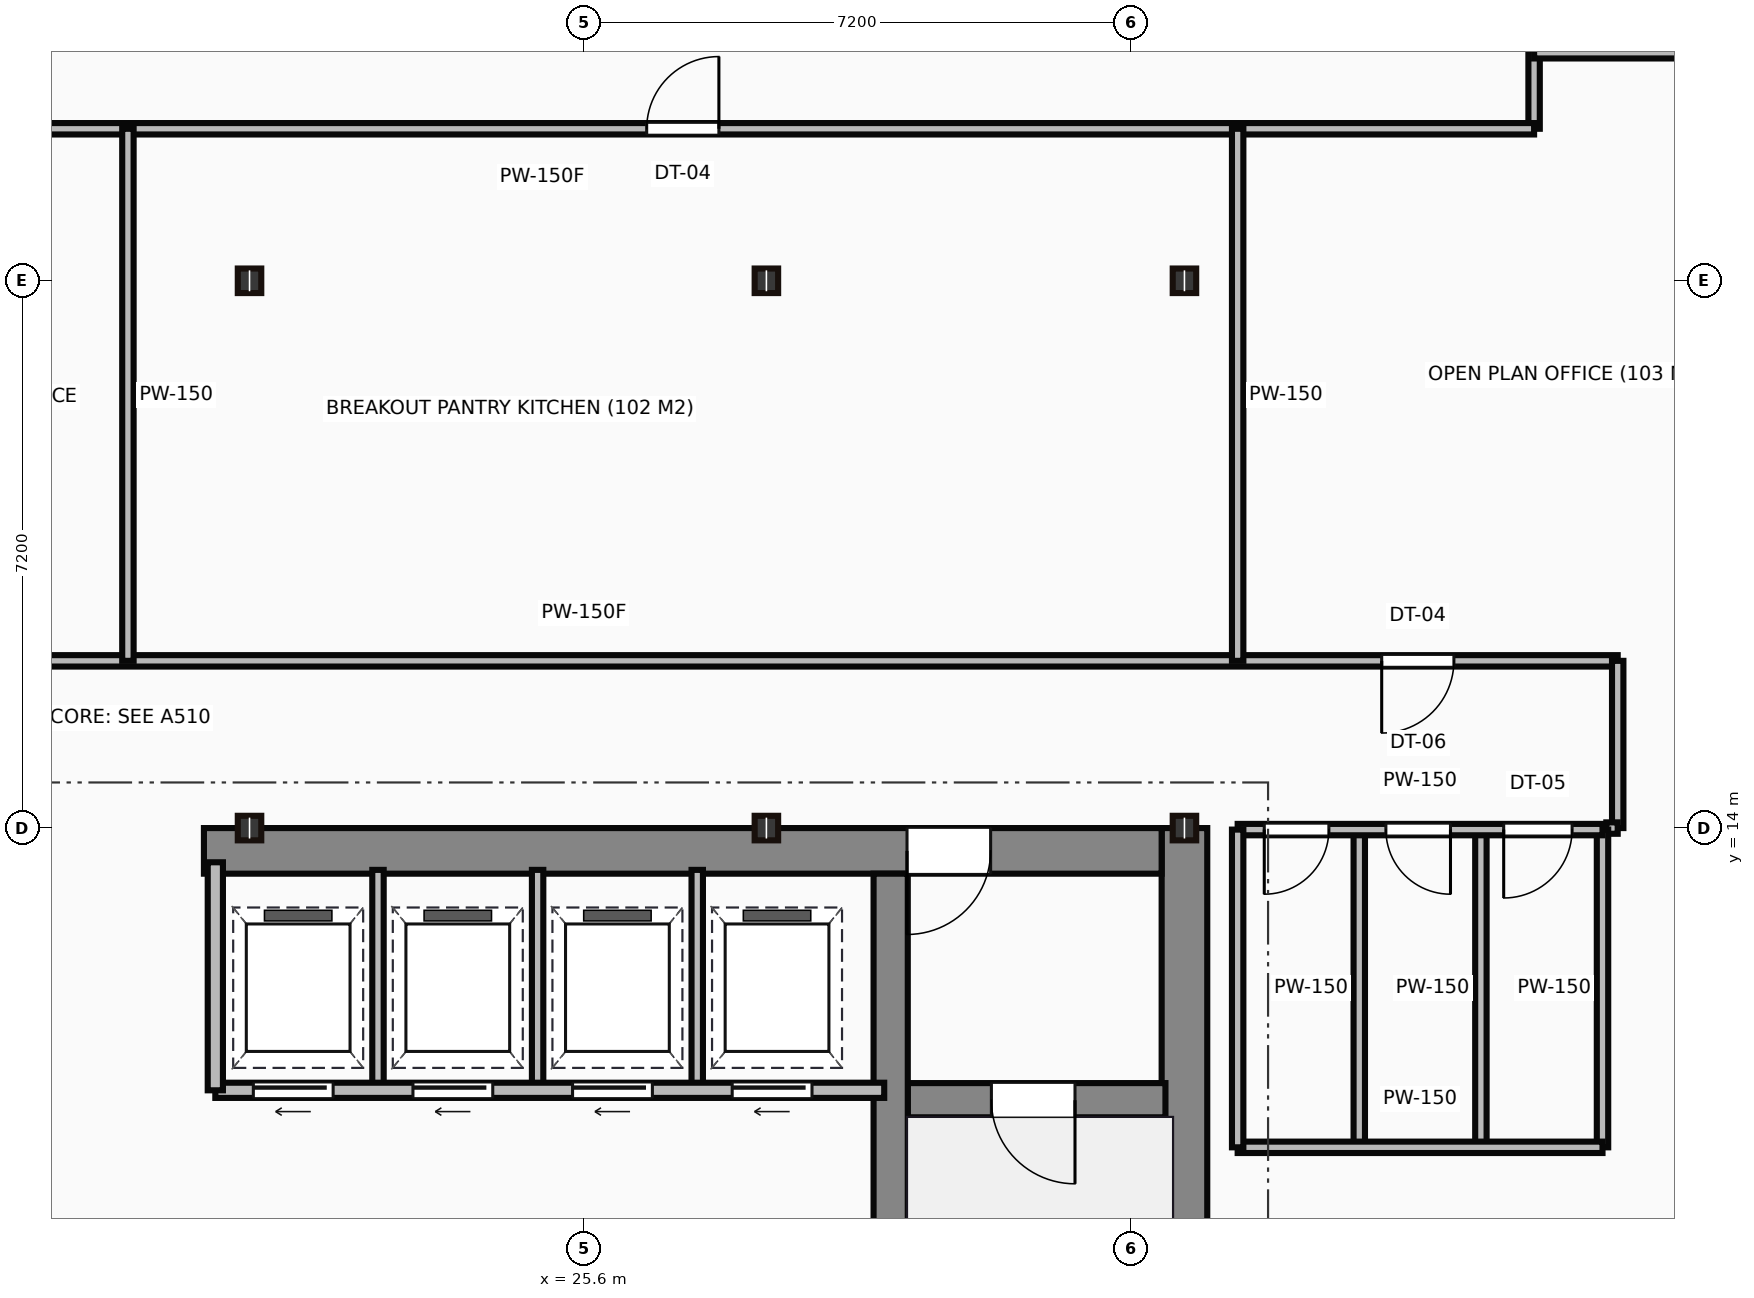
"""IFC4 building model, lengths in metres.
Left out: names, types, materials, properties, quantities, classifications, styles, units other than length and angle.
Written with IfcOpenShell. Run it as: python <this file> out.ifc"""

import sys

from ifc_helpers import new_model, si_unit, direction, frame, frame_2d, origin, origin_2d, place, context, subcontext, project, spatial, rectangle, i_section, extrude, source, transform, mapped, element, fill, save


model = new_model("IFC4")
c1 = context("Model", 3, precision=1e-05, world=origin(), true_north=direction((0.0, 1.0)))
c2 = subcontext(c1, "Body", "Model", "MODEL_VIEW")
j1 = project(units=[si_unit("LENGTHUNIT", "METRE"), si_unit("PLANEANGLEUNIT", "RADIAN")], contexts=[c1])
p1 = place(None, origin())
s1 = spatial("IfcSite", under=j1, at=p1, CompositionType="ELEMENT")
p2 = place(p1, origin())
s2 = spatial("IfcBuilding", under=s1, at=p2, CompositionType="ELEMENT")
p3 = place(p2, frame((0.0, 0.0, 232.4)))
s3 = spatial("IfcBuildingStorey", under=s2, at=p3, CompositionType="ELEMENT", Elevation=232.4)
m1 = source(origin(), c2, "Body", "SweptSolid", [
    extrude(rectangle(XDim=13.1, YDim=0.6, at=frame_2d((6.55, 0.0))), origin(), (0.0, 0.0, 1.0), 3.65),
])
p4 = place(p3, frame((33.5, 0.9, 0.0), z_axis=(0.0, 0.0, 1.0), x_axis=(0.0, 1.0, 0.0)))
e1 = element("IfcWall", 1, at=p4, inside=s3, PredefinedType="SHEAR", context=c2, shape_type="MappedRepresentation", body=[
    mapped(m1, transform((0.0, 0.0, 0.0))),
])
m2 = source(origin(), c2, "Body", "SweptSolid", [
    extrude(rectangle(XDim=12.6, YDim=0.6, at=frame_2d((6.3, 0.0))), origin(), (0.0, 0.0, 1.0), 3.65),
])
p5 = place(p3, frame((20.6, 13.7, 0.0), z_axis=(0.0, 0.0, 1.0), x_axis=(1.0, 0.0, 0.0)))
e2 = element("IfcWall", 2, at=p5, inside=s3, PredefinedType="SHEAR", context=c2, shape_type="MappedRepresentation", body=[
    mapped(m2, transform((0.0, 0.0, 0.0))),
])
p6 = place(p5, frame((9.25, 0.0, 0.0)))
e3 = element("IfcOpeningElement", 3, at=p6, cuts=e2, PredefinedType="OPENING", context=c2, shape_type="SweptSolid", body=[
    extrude(rectangle(XDim=1.1, YDim=2.15, at=frame_2d((0.55, 1.075))), frame((0.0, 0.31, 0.0), z_axis=(0.0, -1.0, 0.0), x_axis=(1.0, 0.0, 0.0)), (0.0, 0.0, 1.0), 0.62),
])
m3 = source(origin(), c2, "Body", "SweptSolid", [
    extrude(rectangle(XDim=12.5, YDim=0.45, at=frame_2d((6.25, 0.0))), origin(), (0.0, 0.0, 1.0), 3.65),
])
p7 = place(p3, frame((29.635, 0.9, 0.0), z_axis=(0.0, 0.0, 1.0), x_axis=(0.0, 1.0, 0.0)))
e4 = element("IfcWall", 4, at=p7, inside=s3, PredefinedType="SHEAR", context=c2, shape_type="MappedRepresentation", body=[
    mapped(m3, transform((0.0, 0.0, 0.0))),
])
m4 = source(origin(), c2, "Body", "SweptSolid", [
    extrude(rectangle(XDim=3.39, YDim=0.45, at=frame_2d((1.695, 0.0))), origin(), (0.0, 0.0, 1.0), 3.65),
])
p8 = place(p3, frame((29.86, 10.42, 0.0), z_axis=(0.0, 0.0, 1.0), x_axis=(1.0, 0.0, 0.0)))
e5 = element("IfcWall", 5, at=p8, inside=s3, PredefinedType="SHEAR", context=c2, shape_type="MappedRepresentation", body=[
    mapped(m4, transform((0.0, 0.0, 0.0))),
])
p9 = place(p8, frame((1.1, 0.0, 0.0)))
e6 = element("IfcOpeningElement", 6, at=p9, cuts=e5, PredefinedType="OPENING", context=c2, shape_type="SweptSolid", body=[
    extrude(rectangle(XDim=1.1, YDim=2.15, at=frame_2d((0.55, 1.075))), frame((0.0, 0.235, 0.0), z_axis=(0.0, -1.0, 0.0), x_axis=(1.0, 0.0, 0.0)), (0.0, 0.0, 1.0), 0.47),
])
m5 = source(origin(), c2, "Body", "SweptSolid", [
    extrude(i_section(OverallWidth=0.309, OverallDepth=0.323, WebThickness=0.014, FlangeThickness=0.023, at=origin_2d()), origin(), (0.0, 0.0, 1.0), 3.65),
])
for number, where, z_axis, x_axis in (
    (7, (21.2, 14.0, 0.0), (0.0, 0.0, 1.0), (1.0, 0.0, 0.0)),
    (8, (21.2, 21.2, 0.0), (0.0, 0.0, 1.0), (1.0, 0.0, 0.0)),
    (9, (28.0, 14.0, 0.0), (0.0, 0.0, 1.0), (1.0, 0.0, 0.0)),
    (10, (28.0, 21.2, 0.0), (0.0, 0.0, 1.0), (1.0, 0.0, 0.0)),
    (11, (33.5, 14.0, 0.0), (0.0, 0.0, 1.0), (1.0, 0.0, 0.0)),
    (12, (33.5, 21.2, 0.0), (0.0, 0.0, 1.0), (1.0, 0.0, 0.0)),
):
    element("IfcColumn", number, at=place(p3, frame(where, z_axis=z_axis, x_axis=x_axis)), inside=s3, PredefinedType="COLUMN", context=c2, shape_type="MappedRepresentation", body=[
        mapped(m5, transform((0.0, 0.0, 0.0))),
    ])
m6 = source(origin(), c2, "Body", "SweptSolid", [
    extrude(rectangle(XDim=8.8, YDim=0.2, at=frame_2d((4.4, 0.0))), origin(), (0.0, 0.0, 1.0), 3.35),
])
p10 = place(p3, frame((20.75, 10.55, 0.0), z_axis=(0.0, 0.0, 1.0), x_axis=(1.0, 0.0, 0.0)))
e13 = element("IfcWall", 13, at=p10, inside=s3, PredefinedType="PARTITIONING", context=c2, shape_type="MappedRepresentation", body=[
    mapped(m6, transform((0.0, 0.0, 0.0))),
])
p11 = place(p10, frame((0.5, 0.0, 0.0)))
e14 = element("IfcOpeningElement", 14, at=p11, cuts=e13, PredefinedType="OPENING", context=c2, shape_type="SweptSolid", body=[
    extrude(rectangle(XDim=1.05, YDim=2.15, at=frame_2d((0.525, 1.075))), frame((0.0, 0.11, 0.0), z_axis=(0.0, -1.0, 0.0), x_axis=(1.0, 0.0, 0.0)), (0.0, 0.0, 1.0), 0.22),
])
p12 = place(p10, frame((2.6, 0.0, 0.0)))
e15 = element("IfcOpeningElement", 15, at=p12, cuts=e13, PredefinedType="OPENING", context=c2, shape_type="SweptSolid", body=[
    extrude(rectangle(XDim=1.05, YDim=2.15, at=frame_2d((0.525, 1.075))), frame((0.0, 0.11, 0.0), z_axis=(0.0, -1.0, 0.0), x_axis=(1.0, 0.0, 0.0)), (0.0, 0.0, 1.0), 0.22),
])
p13 = place(p10, frame((4.7, 0.0, 0.0)))
e16 = element("IfcOpeningElement", 16, at=p13, cuts=e13, PredefinedType="OPENING", context=c2, shape_type="SweptSolid", body=[
    extrude(rectangle(XDim=1.05, YDim=2.15, at=frame_2d((0.525, 1.075))), frame((0.0, 0.11, 0.0), z_axis=(0.0, -1.0, 0.0), x_axis=(1.0, 0.0, 0.0)), (0.0, 0.0, 1.0), 0.22),
])
p14 = place(p10, frame((6.8, 0.0, 0.0)))
e17 = element("IfcOpeningElement", 17, at=p14, cuts=e13, PredefinedType="OPENING", context=c2, shape_type="SweptSolid", body=[
    extrude(rectangle(XDim=1.05, YDim=2.15, at=frame_2d((0.525, 1.075))), frame((0.0, 0.11, 0.0), z_axis=(0.0, -1.0, 0.0), x_axis=(1.0, 0.0, 0.0)), (0.0, 0.0, 1.0), 0.22),
])
m7 = source(origin(), c2, "Body", "SweptSolid", [
    extrude(rectangle(XDim=3.0, YDim=0.2, at=frame_2d((1.5, 0.0))), origin(), (0.0, 0.0, 1.0), 3.35),
])
p15 = place(p3, frame((20.75, 10.55, 0.0), z_axis=(0.0, 0.0, 1.0), x_axis=(0.0, 1.0, 0.0)))
e18 = element("IfcWall", 18, at=p15, inside=s3, PredefinedType="PARTITIONING", context=c2, shape_type="MappedRepresentation", body=[
    mapped(m7, transform((0.0, 0.0, 0.0))),
])
m8 = source(origin(), c2, "Body", "SweptSolid", [
    extrude(rectangle(XDim=2.85, YDim=0.15, at=frame_2d((1.425, 0.0))), origin(), (0.0, 0.0, 1.0), 3.35),
])
for number, where, z_axis, x_axis in (
    (19, (22.89, 10.6, 0.0), (0.0, 0.0, 1.0), (0.0, 1.0, 0.0)),
    (20, (24.99, 10.6, 0.0), (0.0, 0.0, 1.0), (0.0, 1.0, 0.0)),
    (21, (27.09, 10.6, 0.0), (0.0, 0.0, 1.0), (0.0, 1.0, 0.0)),
):
    element("IfcWall", number, at=place(p3, frame(where, z_axis=z_axis, x_axis=x_axis)), inside=s3, PredefinedType="PARTITIONING", context=c2, shape_type="MappedRepresentation", body=[
        mapped(m8, transform((0.0, 0.0, 0.0))),
    ])
m9 = source(origin(), c2, "Body", "SweptSolid", [
    extrude(rectangle(XDim=4.8, YDim=0.15, at=frame_2d((2.4, 0.0))), origin(), (0.0, 0.0, 1.0), 2.737),
])
p16 = place(p3, frame((34.2, 13.98, 0.0), z_axis=(0.0, 0.0, 1.0), x_axis=(1.0, 0.0, 0.0)))
e22 = element("IfcWall", 22, at=p16, inside=s3, PredefinedType="PARTITIONING", context=c2, shape_type="MappedRepresentation", body=[
    mapped(m9, transform((0.0, 0.0, 0.0))),
])
p17 = place(p16, frame((0.35, 0.0, 0.0)))
e23 = element("IfcOpeningElement", 23, at=p17, cuts=e22, PredefinedType="OPENING", context=c2, shape_type="SweptSolid", body=[
    extrude(rectangle(XDim=0.85, YDim=2.1, at=frame_2d((0.425, 1.05))), frame((0.0, 0.085, 0.0), z_axis=(0.0, -1.0, 0.0), x_axis=(1.0, 0.0, 0.0)), (0.0, 0.0, 1.0), 0.17),
])
p18 = place(p16, frame((1.95, 0.0, 0.0)))
e24 = element("IfcOpeningElement", 24, at=p18, cuts=e22, PredefinedType="OPENING", context=c2, shape_type="SweptSolid", body=[
    extrude(rectangle(XDim=0.85, YDim=2.1, at=frame_2d((0.425, 1.05))), frame((0.0, 0.085, 0.0), z_axis=(0.0, -1.0, 0.0), x_axis=(1.0, 0.0, 0.0)), (0.0, 0.0, 1.0), 0.17),
])
p19 = place(p16, frame((3.5, 0.0, 0.0)))
e25 = element("IfcOpeningElement", 25, at=p19, cuts=e22, PredefinedType="OPENING", context=c2, shape_type="SweptSolid", body=[
    extrude(rectangle(XDim=0.9, YDim=2.1, at=frame_2d((0.45, 1.05))), frame((0.0, 0.085, 0.0), z_axis=(0.0, -1.0, 0.0), x_axis=(1.0, 0.0, 0.0)), (0.0, 0.0, 1.0), 0.17),
])
m10 = source(origin(), c2, "Body", "SweptSolid", [
    extrude(rectangle(XDim=4.8, YDim=0.15, at=frame_2d((2.4, 0.0))), origin(), (0.0, 0.0, 1.0), 3.35),
])
p20 = place(p3, frame((34.2, 9.8, 0.0), z_axis=(0.0, 0.0, 1.0), x_axis=(1.0, 0.0, 0.0)))
e26 = element("IfcWall", 26, at=p20, inside=s3, PredefinedType="PARTITIONING", context=c2, shape_type="MappedRepresentation", body=[
    mapped(m10, transform((0.0, 0.0, 0.0))),
])
m11 = source(origin(), c2, "Body", "SweptSolid", [
    extrude(rectangle(XDim=4.18, YDim=0.15, at=frame_2d((2.09, 0.0))), origin(), (0.0, 0.0, 1.0), 3.35),
])
for number, where, z_axis, x_axis in (
    (27, (39.0, 9.8, 0.0), (0.0, 0.0, 1.0), (0.0, 1.0, 0.0)),
    (28, (34.2, 9.8, 0.0), (0.0, 0.0, 1.0), (0.0, 1.0, 0.0)),
    (29, (35.8, 9.8, 0.0), (0.0, 0.0, 1.0), (0.0, 1.0, 0.0)),
    (30, (37.4, 9.8, 0.0), (0.0, 0.0, 1.0), (0.0, 1.0, 0.0)),
):
    element("IfcWall", number, at=place(p3, frame(where, z_axis=z_axis, x_axis=x_axis)), inside=s3, PredefinedType="PARTITIONING", context=c2, shape_type="MappedRepresentation", body=[
        mapped(m11, transform((0.0, 0.0, 0.0))),
    ])
m12 = source(origin(), c2, "Body", "SweptSolid", [
    extrude(rectangle(XDim=2.05, YDim=0.15, at=frame_2d((1.025, 0.0))), origin(), (0.0, 0.0, 1.0), 3.35),
])
p21 = place(p3, frame((38.1, 25.25, 0.0), z_axis=(0.0, 0.0, 1.0), x_axis=(0.0, -1.0, 0.0)))
e31 = element("IfcWall", 31, at=p21, inside=s3, PredefinedType="PARTITIONING", context=c2, shape_type="MappedRepresentation", body=[
    mapped(m12, transform((0.0, 0.0, 0.0))),
])
m13 = source(origin(), c2, "Body", "SweptSolid", [
    extrude(rectangle(XDim=26.1, YDim=0.15, at=frame_2d((13.05, 0.0))), origin(), (0.0, 0.0, 1.0), 3.35),
])
p22 = place(p3, frame((38.1, 23.2, 0.0), z_axis=(0.0, 0.0, 1.0), x_axis=(-1.0, 0.0, 0.0)))
e32 = element("IfcWall", 32, at=p22, inside=s3, PredefinedType="PARTITIONING", context=c2, shape_type="MappedRepresentation", body=[
    mapped(m13, transform((0.0, 0.0, 0.0))),
])
p23 = place(p22, frame((10.725, 0.0, 0.0)))
e33 = element("IfcOpeningElement", 33, at=p23, cuts=e32, PredefinedType="OPENING", context=c2, shape_type="SweptSolid", body=[
    extrude(rectangle(XDim=0.95, YDim=2.15, at=frame_2d((0.475, 1.075))), frame((0.0, 0.085, 0.0), z_axis=(0.0, -1.0, 0.0), x_axis=(1.0, 0.0, 0.0)), (0.0, 0.0, 1.0), 0.17),
])
m14 = source(origin(), c2, "Body", "SweptSolid", [
    extrude(rectangle(XDim=27.2, YDim=0.15, at=frame_2d((13.6, 0.0))), origin(), (0.0, 0.0, 1.0), 3.35),
])
p24 = place(p3, frame((12.0, 16.2, 0.0), z_axis=(0.0, 0.0, 1.0), x_axis=(1.0, 0.0, 0.0)))
e34 = element("IfcWall", 34, at=p24, inside=s3, PredefinedType="PARTITIONING", context=c2, shape_type="MappedRepresentation", body=[
    mapped(m14, transform((0.0, 0.0, 0.0))),
])
p25 = place(p24, frame((3.455, 0.0, 0.0)))
e35 = element("IfcOpeningElement", 35, at=p25, cuts=e34, PredefinedType="OPENING", context=c2, shape_type="SweptSolid", body=[
    extrude(rectangle(XDim=0.95, YDim=2.15, at=frame_2d((0.475, 1.075))), frame((0.0, 0.085, 0.0), z_axis=(0.0, -1.0, 0.0), x_axis=(1.0, 0.0, 0.0)), (0.0, 0.0, 1.0), 0.17),
])
p26 = place(p24, frame((24.095, 0.0, 0.0)))
e36 = element("IfcOpeningElement", 36, at=p26, cuts=e34, PredefinedType="OPENING", context=c2, shape_type="SweptSolid", body=[
    extrude(rectangle(XDim=0.95, YDim=2.15, at=frame_2d((0.475, 1.075))), frame((0.0, 0.085, 0.0), z_axis=(0.0, -1.0, 0.0), x_axis=(1.0, 0.0, 0.0)), (0.0, 0.0, 1.0), 0.17),
])
m15 = source(origin(), c2, "Body", "SweptSolid", [
    extrude(rectangle(XDim=2.2, YDim=0.15, at=frame_2d((1.1, 0.0))), origin(), (0.0, 0.0, 1.0), 3.35),
])
p27 = place(p3, frame((39.2, 16.2, 0.0), z_axis=(0.0, 0.0, 1.0), x_axis=(0.0, -1.0, 0.0)))
e37 = element("IfcWall", 37, at=p27, inside=s3, PredefinedType="PARTITIONING", context=c2, shape_type="MappedRepresentation", body=[
    mapped(m15, transform((0.0, 0.0, 0.0))),
])
m16 = source(origin(), c2, "Body", "SweptSolid", [
    extrude(rectangle(XDim=0.15, YDim=0.15, at=frame_2d((0.075, 0.0))), origin(), (0.0, 0.0, 1.0), 3.35),
])
p28 = place(p3, frame((39.2, 14.0, 0.0), z_axis=(0.0, 0.0, 1.0), x_axis=(-1.0, 0.0, 0.0)))
e38 = element("IfcWall", 38, at=p28, inside=s3, PredefinedType="PARTITIONING", context=c2, shape_type="MappedRepresentation", body=[
    mapped(m16, transform((0.0, 0.0, 0.0))),
])
m17 = source(origin(), c2, "Body", "SweptSolid", [
    extrude(rectangle(XDim=7.0, YDim=0.15, at=frame_2d((3.5, 0.0))), origin(), (0.0, 0.0, 1.0), 3.35),
])
for number, where, z_axis, x_axis in (
    (39, (19.6, 23.2, 0.0), (0.0, 0.0, 1.0), (0.0, -1.0, 0.0)),
    (40, (34.2, 23.2, 0.0), (0.0, 0.0, 1.0), (0.0, -1.0, 0.0)),
):
    element("IfcWall", number, at=place(p3, frame(where, z_axis=z_axis, x_axis=x_axis)), inside=s3, PredefinedType="PARTITIONING", context=c2, shape_type="MappedRepresentation", body=[
        mapped(m17, transform((0.0, 0.0, 0.0))),
    ])
m18 = source(origin(), c2, "Body", "SweptSolid", [
    extrude(rectangle(XDim=4.88, YDim=0.15, at=frame_2d((2.44, 0.0))), origin(), (0.0, 0.0, 1.0), 3.35),
])
p29 = place(p3, frame((42.98, 24.2, 0.0), z_axis=(0.0, 0.0, 1.0), x_axis=(-1.0, 0.0, 0.0)))
e41 = element("IfcWall", 41, at=p29, inside=s3, PredefinedType="PARTITIONING", context=c2, shape_type="MappedRepresentation", body=[
    mapped(m18, transform((0.0, 0.0, 0.0))),
])
m19 = source(origin(), c2, "Body", "SweptSolid", [
    extrude(rectangle(XDim=1.1, YDim=2.15, at=frame_2d((0.55, 1.075))), frame((0.0, 0.025, 0.0), z_axis=(0.0, -1.0, 0.0), x_axis=(1.0, 0.0, 0.0)), (0.0, 0.0, 1.0), 0.05),
])
p30 = place(p9, frame((1.1, 0.0, 0.0), z_axis=(0.0, 0.0, 1.0), x_axis=(-1.0, 0.0, 0.0)))
e42 = element("IfcDoor", 42, at=p30, inside=s3, OperationType="SINGLE_SWING_RIGHT", PredefinedType="DOOR", context=c2, shape_type="MappedRepresentation", body=[
    mapped(m19, transform((0.0, 0.0, 0.0))),
])
fill(e6, e42)
p31 = place(p6, origin())
e43 = element("IfcDoor", 43, at=p31, inside=s3, OperationType="SINGLE_SWING_LEFT", PredefinedType="DOOR", context=c2, shape_type="MappedRepresentation", body=[
    mapped(m19, transform((0.0, 0.0, 0.0))),
])
fill(e3, e43)
m20 = source(origin(), c2, "Body", "SweptSolid", [
    extrude(rectangle(XDim=1.05, YDim=2.15, at=frame_2d((0.525, 1.075))), frame((0.0, 0.025, 0.0), z_axis=(0.0, -1.0, 0.0), x_axis=(1.0, 0.0, 0.0)), (0.0, 0.0, 1.0), 0.05),
])
p32 = place(p11, frame((1.05, 0.0, 0.0), z_axis=(0.0, 0.0, 1.0), x_axis=(-1.0, 0.0, 0.0)))
e44 = element("IfcDoor", 44, at=p32, inside=s3, OperationType="SLIDING_TO_LEFT", PredefinedType="DOOR", context=c2, shape_type="MappedRepresentation", body=[
    mapped(m20, transform((0.0, 0.0, 0.0))),
])
fill(e14, e44)
p33 = place(p12, frame((1.05, 0.0, 0.0), z_axis=(0.0, 0.0, 1.0), x_axis=(-1.0, 0.0, 0.0)))
e45 = element("IfcDoor", 45, at=p33, inside=s3, OperationType="SLIDING_TO_LEFT", PredefinedType="DOOR", context=c2, shape_type="MappedRepresentation", body=[
    mapped(m20, transform((0.0, 0.0, 0.0))),
])
fill(e15, e45)
p34 = place(p13, frame((1.05, 0.0, 0.0), z_axis=(0.0, 0.0, 1.0), x_axis=(-1.0, 0.0, 0.0)))
e46 = element("IfcDoor", 46, at=p34, inside=s3, OperationType="SLIDING_TO_LEFT", PredefinedType="DOOR", context=c2, shape_type="MappedRepresentation", body=[
    mapped(m20, transform((0.0, 0.0, 0.0))),
])
fill(e16, e46)
p35 = place(p14, frame((1.05, 0.0, 0.0), z_axis=(0.0, 0.0, 1.0), x_axis=(-1.0, 0.0, 0.0)))
e47 = element("IfcDoor", 47, at=p35, inside=s3, OperationType="SLIDING_TO_LEFT", PredefinedType="DOOR", context=c2, shape_type="MappedRepresentation", body=[
    mapped(m20, transform((0.0, 0.0, 0.0))),
])
fill(e17, e47)
m21 = source(origin(), c2, "Body", "SweptSolid", [
    extrude(rectangle(XDim=0.85, YDim=2.1, at=frame_2d((0.425, 1.05))), frame((0.0, 0.025, 0.0), z_axis=(0.0, -1.0, 0.0), x_axis=(1.0, 0.0, 0.0)), (0.0, 0.0, 1.0), 0.05),
])
p36 = place(p17, frame((0.85, 0.0, 0.0), z_axis=(0.0, 0.0, 1.0), x_axis=(-1.0, 0.0, 0.0)))
e48 = element("IfcDoor", 48, at=p36, inside=s3, OperationType="SINGLE_SWING_LEFT", PredefinedType="DOOR", context=c2, shape_type="MappedRepresentation", body=[
    mapped(m21, transform((0.0, 0.0, 0.0))),
])
fill(e23, e48)
p37 = place(p18, frame((0.85, 0.0, 0.0), z_axis=(0.0, 0.0, 1.0), x_axis=(-1.0, 0.0, 0.0)))
e49 = element("IfcDoor", 49, at=p37, inside=s3, OperationType="SINGLE_SWING_RIGHT", PredefinedType="DOOR", context=c2, shape_type="MappedRepresentation", body=[
    mapped(m21, transform((0.0, 0.0, 0.0))),
])
fill(e24, e49)
m22 = source(origin(), c2, "Body", "SweptSolid", [
    extrude(rectangle(XDim=0.9, YDim=2.1, at=frame_2d((0.45, 1.05))), frame((0.0, 0.025, 0.0), z_axis=(0.0, -1.0, 0.0), x_axis=(1.0, 0.0, 0.0)), (0.0, 0.0, 1.0), 0.05),
])
p38 = place(p19, frame((0.9, 0.0, 0.0), z_axis=(0.0, 0.0, 1.0), x_axis=(-1.0, 0.0, 0.0)))
e50 = element("IfcDoor", 50, at=p38, inside=s3, OperationType="SINGLE_SWING_LEFT", PredefinedType="DOOR", context=c2, shape_type="MappedRepresentation", body=[
    mapped(m22, transform((0.0, 0.0, 0.0))),
])
fill(e25, e50)
m23 = source(origin(), c2, "Body", "SweptSolid", [
    extrude(rectangle(XDim=0.95, YDim=2.15, at=frame_2d((0.475, 1.075))), frame((0.0, 0.025, 0.0), z_axis=(0.0, -1.0, 0.0), x_axis=(1.0, 0.0, 0.0)), (0.0, 0.0, 1.0), 0.05),
])
p39 = place(p23, origin())
e51 = element("IfcDoor", 51, at=p39, inside=s3, OperationType="SINGLE_SWING_LEFT", PredefinedType="DOOR", context=c2, shape_type="MappedRepresentation", body=[
    mapped(m23, transform((0.0, 0.0, 0.0))),
])
fill(e33, e51)
p40 = place(p26, origin())
e52 = element("IfcDoor", 52, at=p40, inside=s3, OperationType="SINGLE_SWING_LEFT", PredefinedType="DOOR", context=c2, shape_type="MappedRepresentation", body=[
    mapped(m23, transform((0.0, 0.0, 0.0))),
])
fill(e36, e52)
save(model, sys.argv[1])
